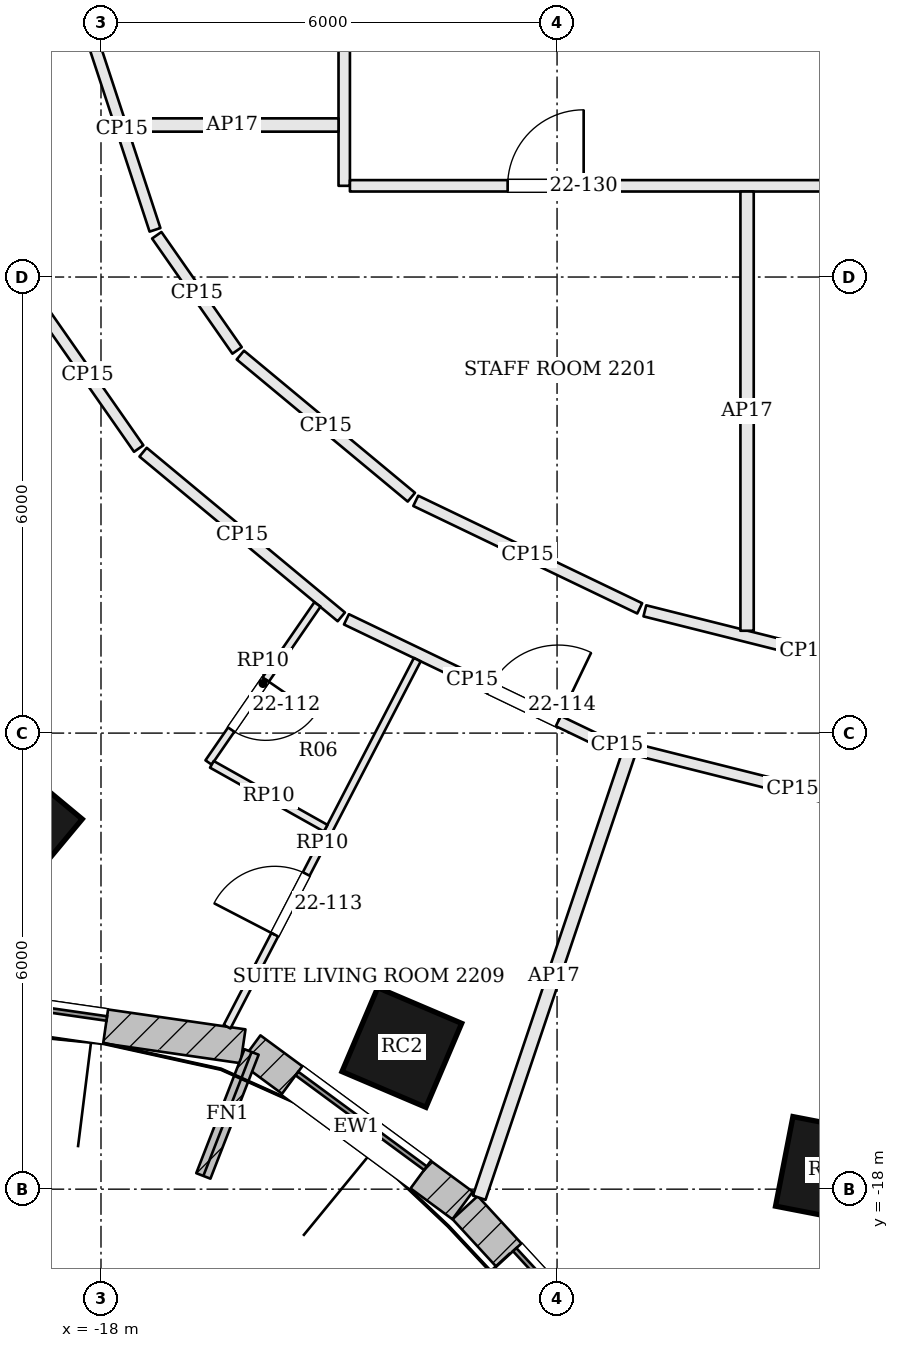
"""IFC4 building model, lengths in metres.
Left out: names, types, materials, properties, quantities, classifications, styles, units other than length and angle.
Written with IfcOpenShell. Run it as: python <this file> out.ifc"""

import sys

from ifc_helpers import new_model, si_unit, direction, frame, frame_2d, origin, origin_2d, place, context, subcontext, project, spatial, rectangle, extrude, element, fill, save


model = new_model("IFC4")
c1 = context("Model", 3, precision=1e-05, world=origin(), true_north=direction((0.0, 1.0)))
c2 = subcontext(c1, "Body", "Model", "MODEL_VIEW")
j1 = project(units=[si_unit("LENGTHUNIT", "METRE"), si_unit("PLANEANGLEUNIT", "RADIAN")], contexts=[c1])
p1 = place(None, origin())
s1 = spatial("IfcSite", under=j1, at=p1, CompositionType="ELEMENT")
p2 = place(p1, origin())
s2 = spatial("IfcBuilding", under=s1, at=p2, CompositionType="ELEMENT")
p3 = place(p2, frame((0.0, 0.0, 96.0)))
s3 = spatial("IfcBuildingStorey", under=s2, at=p3, CompositionType="ELEMENT", Elevation=96.0)
for number, where, z_axis, x_axis in (
    (1, (-19.092, -13.209, 0.0), (0.0, 0.0, 1.0), (0.769, -0.639, 0.0)),
    (2, (-14.042, -16.136, 0.0), (0.0, 0.0, 1.0), (0.92, -0.392, 0.0)),
    (3, (-8.422, -17.749, 0.0), (0.0, 0.0, 1.0), (0.982, -0.191, 0.0)),
):
    element("IfcColumn", number, at=place(p3, frame(where, z_axis=z_axis, x_axis=x_axis)), inside=s3, PredefinedType="COLUMN", context=c2, shape_type="SweptSolid", body=[
        extrude(rectangle(XDim=1.2, YDim=1.2, at=origin_2d()), origin(), (0.0, 0.0, 1.0), 3.6),
    ])
p4 = place(p3, frame((-21.825, -15.297, 0.0), z_axis=(0.0, 0.0, 1.0), x_axis=(0.98971474215, -0.143054986527, 0.0)))
e4 = element("IfcWall", 4, at=p4, inside=s3, PredefinedType="SOLIDWALL", context=c2, shape_type="SweptSolid", body=[
    extrude(rectangle(XDim=5.753, YDim=0.45, at=frame_2d((2.876, 0.0))), origin(), (0.0, 0.0, 1.0), 3.4),
])
p5 = place(p4, frame((1.826, 0.0, 0.9)))
e5 = element("IfcOpeningElement", 5, at=p5, cuts=e4, PredefinedType="OPENING", context=c2, shape_type="SweptSolid", body=[
    extrude(rectangle(XDim=2.1, YDim=2.0, at=frame_2d((1.05, 1.0))), frame((0.0, 0.235, 0.0), z_axis=(0.0, -1.0, 0.0), x_axis=(1.0, 0.0, 0.0)), (0.0, 0.0, 1.0), 0.47),
])
p6 = place(p3, frame((-16.036, -16.158, 0.0), z_axis=(0.0, 0.0, 1.0), x_axis=(0.805181432967, -0.593028549064, 0.0)))
e6 = element("IfcWall", 6, at=p6, inside=s3, PredefinedType="SOLIDWALL", context=c2, shape_type="SweptSolid", body=[
    extrude(rectangle(XDim=3.469, YDim=0.45, at=frame_2d((1.734, 0.0))), origin(), (0.0, 0.0, 1.0), 3.4),
])
p7 = place(p6, frame((0.684, 0.0, 0.9)))
e7 = element("IfcOpeningElement", 7, at=p7, cuts=e6, PredefinedType="OPENING", context=c2, shape_type="SweptSolid", body=[
    extrude(rectangle(XDim=2.1, YDim=2.0, at=frame_2d((1.05, 1.0))), frame((0.0, 0.235, 0.0), z_axis=(0.0, -1.0, 0.0), x_axis=(1.0, 0.0, 0.0)), (0.0, 0.0, 1.0), 0.47),
])
p8 = place(p3, frame((-13.209, -18.243, 0.0), z_axis=(0.0, 0.0, 1.0), x_axis=(0.677612152497, -0.735419452278, 0.0)))
e8 = element("IfcWall", 8, at=p8, inside=s3, PredefinedType="SOLIDWALL", context=c2, shape_type="SweptSolid", body=[
    extrude(rectangle(XDim=3.797, YDim=0.45, at=frame_2d((1.898, 0.0))), origin(), (0.0, 0.0, 1.0), 3.4),
])
p9 = place(p8, frame((0.848, 0.0, 0.9)))
e9 = element("IfcOpeningElement", 9, at=p9, cuts=e8, PredefinedType="OPENING", context=c2, shape_type="SweptSolid", body=[
    extrude(rectangle(XDim=2.1, YDim=2.0, at=frame_2d((1.05, 1.0))), frame((0.0, 0.235, 0.0), z_axis=(0.0, -1.0, 0.0), x_axis=(1.0, 0.0, 0.0)), (0.0, 0.0, 1.0), 0.47),
])
p10 = place(p3, frame((-16.019, -16.195, 0.0), z_axis=(0.0, 0.0, 1.0), x_axis=(-0.362641522028, -0.931928713208, 0.0)))
e10 = element("IfcWall", 10, at=p10, inside=s3, PredefinedType="SOLIDWALL", context=c2, shape_type="SweptSolid", body=[
    extrude(rectangle(XDim=1.75, YDim=0.2, at=frame_2d((0.875, 0.0))), origin(), (0.0, 0.0, 1.0), 3.4),
])
p11 = place(p3, frame((-18.851, -6.325, 0.0), z_axis=(0.0, 0.0, 1.0), x_axis=(0.572090775968, -0.820190309656, 0.0)))
e11 = element("IfcWall", 11, at=p11, inside=s3, PredefinedType="PARTITIONING", context=c2, shape_type="SweptSolid", body=[
    extrude(rectangle(XDim=2.355, YDim=0.15, at=frame_2d((1.177, 0.0))), origin(), (0.0, 0.0, 1.0), 2.784),
])
p12 = place(p3, frame((-17.446, -8.304, 0.0), z_axis=(0.0, 0.0, 1.0), x_axis=(0.769200174495, -0.639007896318, 0.0)))
e12 = element("IfcWall", 12, at=p12, inside=s3, PredefinedType="PARTITIONING", context=c2, shape_type="SweptSolid", body=[
    extrude(rectangle(XDim=3.39, YDim=0.15, at=frame_2d((1.695, 0.0))), origin(), (0.0, 0.0, 1.0), 2.784),
])
p13 = place(p3, frame((-14.771, -10.503, 0.0), z_axis=(0.0, 0.0, 1.0), x_axis=(0.901503349553, -0.432772123346, 0.0)))
e13 = element("IfcWall", 13, at=p13, inside=s3, PredefinedType="PARTITIONING", context=c2, shape_type="SweptSolid", body=[
    extrude(rectangle(XDim=3.673, YDim=0.15, at=frame_2d((1.836, 0.0))), origin(), (0.0, 0.0, 1.0), 2.784),
])
p14 = place(p13, frame((2.092, 0.0, 0.0)))
e14 = element("IfcOpeningElement", 14, at=p14, cuts=e13, PredefinedType="OPENING", context=c2, shape_type="SweptSolid", body=[
    extrude(rectangle(XDim=1.0, YDim=2.1, at=frame_2d((0.5, 1.05))), frame((0.0, 0.085, 0.0), z_axis=(0.0, -1.0, 0.0), x_axis=(1.0, 0.0, 0.0)), (0.0, 0.0, 1.0), 0.17),
])
p15 = place(p3, frame((-11.387, -12.111, 0.0), z_axis=(0.0, 0.0, 1.0), x_axis=(0.969945028314, -0.243324150157, 0.0)))
e15 = element("IfcWall", 15, at=p15, inside=s3, PredefinedType="PARTITIONING", context=c2, shape_type="SweptSolid", body=[
    extrude(rectangle(XDim=0.364, YDim=0.15, at=frame_2d((0.182, 0.0))), origin(), (0.0, 0.0, 1.0), 2.784),
])
p16 = place(p3, frame((-13.024, -18.112, 0.0), z_axis=(0.0, 0.0, 1.0), x_axis=(0.319078434674, 0.947728311556, 0.0)))
e16 = element("IfcWall", 16, at=p16, inside=s3, PredefinedType="PARTITIONING", context=c2, shape_type="SweptSolid", body=[
    extrude(rectangle(XDim=6.163, YDim=0.175, at=frame_2d((3.082, 0.0))), origin(), (0.0, 0.0, 1.0), 2.784),
])
p17 = place(p3, frame((-10.961, -12.218, 0.0), z_axis=(0.0, 0.0, 1.0), x_axis=(0.969990045386, -0.243144631551, 0.0)))
e17 = element("IfcWall", 17, at=p17, inside=s3, PredefinedType="PARTITIONING", context=c2, shape_type="SweptSolid", body=[
    extrude(rectangle(XDim=4.244, YDim=0.15, at=frame_2d((2.122, 0.0))), origin(), (0.0, 0.0, 1.0), 2.784),
])
p18 = place(p3, frame((-6.617, -11.451, 0.0), z_axis=(0.0, 0.0, 1.0), x_axis=(-0.969987441267, 0.243155020069, 0.0)))
e18 = element("IfcWall", 18, at=p18, inside=s3, PredefinedType="PARTITIONING", context=c2, shape_type="SweptSolid", body=[
    extrude(rectangle(XDim=4.359, YDim=0.15, at=frame_2d((2.179, 0.0))), origin(), (0.0, 0.0, 1.0), 2.784),
])
p19 = place(p3, frame((-10.913, -10.359, 0.0), z_axis=(0.0, 0.0, 1.0), x_axis=(-0.90149741277, 0.432784489982, 0.0)))
e19 = element("IfcWall", 19, at=p19, inside=s3, PredefinedType="PARTITIONING", context=c2, shape_type="SweptSolid", body=[
    extrude(rectangle(XDim=3.269, YDim=0.15, at=frame_2d((1.634, 0.0))), origin(), (0.0, 0.0, 1.0), 2.784),
])
p20 = place(p3, frame((-13.917, -8.896, 0.0), z_axis=(0.0, 0.0, 1.0), x_axis=(-0.769130409479, 0.639091866021, 0.0)))
e20 = element("IfcWall", 20, at=p20, inside=s3, PredefinedType="PARTITIONING", context=c2, shape_type="SweptSolid", body=[
    extrude(rectangle(XDim=2.925, YDim=0.15, at=frame_2d((1.462, 0.0))), origin(), (0.0, 0.0, 1.0), 2.784),
])
p21 = place(p3, frame((-16.209, -6.966, 0.0), z_axis=(0.0, 0.0, 1.0), x_axis=(-0.572051367607, 0.820217795966, 0.0)))
e21 = element("IfcWall", 21, at=p21, inside=s3, PredefinedType="PARTITIONING", context=c2, shape_type="SweptSolid", body=[
    extrude(rectangle(XDim=1.848, YDim=0.15, at=frame_2d((0.924, 0.0))), origin(), (0.0, 0.0, 1.0), 2.784),
])
p22 = place(p3, frame((-17.29, -5.379, 0.0), z_axis=(0.0, 0.0, 1.0), x_axis=(-0.312009486843, 0.950078986253, 0.0)))
e22 = element("IfcWall", 22, at=p22, inside=s3, PredefinedType="PARTITIONING", context=c2, shape_type="SweptSolid", body=[
    extrude(rectangle(XDim=2.78, YDim=0.15, at=frame_2d((1.39, 0.0))), origin(), (0.0, 0.0, 1.0), 2.784),
])
p23 = place(p3, frame((-14.8, 8.148, 0.0), z_axis=(0.0, 0.0, 1.0), x_axis=(0.0, -1.0, 0.0)))
e23 = element("IfcWall", 23, at=p23, inside=s3, PredefinedType="PARTITIONING", context=c2, shape_type="SweptSolid", body=[
    extrude(rectangle(XDim=12.948, YDim=0.15, at=frame_2d((6.474, 0.0))), origin(), (0.0, 0.0, 1.0), 2.784),
])
p24 = place(p23, frame((5.687, 0.0, 0.0)))
e24 = element("IfcOpeningElement", 24, at=p24, cuts=e23, PredefinedType="OPENING", context=c2, shape_type="SweptSolid", body=[
    extrude(rectangle(XDim=0.7, YDim=2.1, at=frame_2d((0.35, 1.05))), frame((0.0, 0.085, 0.0), z_axis=(0.0, -1.0, 0.0), x_axis=(1.0, 0.0, 0.0)), (0.0, 0.0, 1.0), 0.17),
])
p25 = place(p3, frame((-14.725, -4.8, 0.0), z_axis=(0.0, 0.0, 1.0), x_axis=(1.0, 0.0, 0.0)))
e25 = element("IfcWall", 25, at=p25, inside=s3, PredefinedType="PARTITIONING", context=c2, shape_type="SweptSolid", body=[
    extrude(rectangle(XDim=29.525, YDim=0.15, at=frame_2d((14.763, 0.0))), origin(), (0.0, 0.0, 1.0), 2.784),
])
p26 = place(p25, frame((2.075, 0.0, 0.0)))
e26 = element("IfcOpeningElement", 26, at=p26, cuts=e25, PredefinedType="OPENING", context=c2, shape_type="SweptSolid", body=[
    extrude(rectangle(XDim=1.0, YDim=2.1, at=frame_2d((0.5, 1.05))), frame((0.0, 0.085, 0.0), z_axis=(0.0, -1.0, 0.0), x_axis=(1.0, 0.0, 0.0)), (0.0, 0.0, 1.0), 0.17),
])
p27 = place(p25, frame((13.825, 0.0, 0.0)))
e27 = element("IfcOpeningElement", 27, at=p27, cuts=e25, PredefinedType="OPENING", context=c2, shape_type="SweptSolid", body=[
    extrude(rectangle(XDim=1.8, YDim=2.1, at=frame_2d((0.9, 1.05))), frame((0.0, 0.085, 0.0), z_axis=(0.0, -1.0, 0.0), x_axis=(1.0, 0.0, 0.0)), (0.0, 0.0, 1.0), 0.17),
])
p28 = place(p25, frame((26.525, 0.0, 0.0)))
e28 = element("IfcOpeningElement", 28, at=p28, cuts=e25, PredefinedType="OPENING", context=c2, shape_type="SweptSolid", body=[
    extrude(rectangle(XDim=0.7, YDim=2.1, at=frame_2d((0.35, 1.05))), frame((0.0, 0.085, 0.0), z_axis=(0.0, -1.0, 0.0), x_axis=(1.0, 0.0, 0.0)), (0.0, 0.0, 1.0), 0.17),
])
p29 = place(p3, frame((-16.341, -15.862, 0.0), z_axis=(0.0, 0.0, 1.0), x_axis=(0.460149427678, 0.887841485969, 0.0)))
e29 = element("IfcWall", 29, at=p29, inside=s3, PredefinedType="PARTITIONING", context=c2, shape_type="SweptSolid", body=[
    extrude(rectangle(XDim=5.438, YDim=0.1, at=frame_2d((2.719, 0.0))), origin(), (0.0, 0.0, 1.0), 2.884),
])
p30 = place(p29, frame((1.363, 0.0, 0.0)))
e30 = element("IfcOpeningElement", 30, at=p30, cuts=e29, PredefinedType="OPENING", context=c2, shape_type="SweptSolid", body=[
    extrude(rectangle(XDim=0.9, YDim=2.4, at=frame_2d((0.45, 1.2))), frame((0.0, 0.06, 0.0), z_axis=(0.0, -1.0, 0.0), x_axis=(1.0, 0.0, 0.0)), (0.0, 0.0, 1.0), 0.12),
])
p31 = place(p3, frame((-15.152, -10.307, 0.0), z_axis=(0.0, 0.0, 1.0), x_axis=(-0.567242581317, -0.823550759784, 0.0)))
e31 = element("IfcWall", 31, at=p31, inside=s3, PredefinedType="PARTITIONING", context=c2, shape_type="SweptSolid", body=[
    extrude(rectangle(XDim=2.525, YDim=0.1, at=frame_2d((1.263, 0.0))), origin(), (0.0, 0.0, 1.0), 2.884),
])
p32 = place(p31, frame((1.2, 0.0, 0.0)))
e32 = element("IfcOpeningElement", 32, at=p32, cuts=e31, PredefinedType="OPENING", context=c2, shape_type="SweptSolid", body=[
    extrude(rectangle(XDim=0.8, YDim=2.1, at=frame_2d((0.4, 1.05))), frame((0.0, 0.06, 0.0), z_axis=(0.0, -1.0, 0.0), x_axis=(1.0, 0.0, 0.0)), (0.0, 0.0, 1.0), 0.12),
])
p33 = place(p3, frame((-16.541, -12.411, 0.0), z_axis=(0.0, 0.0, 1.0), x_axis=(0.872042364088, -0.489430398765, 0.0)))
e33 = element("IfcWall", 33, at=p33, inside=s3, PredefinedType="PARTITIONING", context=c2, shape_type="SweptSolid", body=[
    extrude(rectangle(XDim=1.717, YDim=0.1, at=frame_2d((0.858, 0.0))), origin(), (0.0, 0.0, 1.0), 2.884),
])
p34 = place(p3, frame((-9.5, -10.654, 0.0), z_axis=(0.0, 0.0, 1.0), x_axis=(0.0, 1.0, 0.0)))
e34 = element("IfcWall", 34, at=p34, inside=s3, PredefinedType="PARTITIONING", context=c2, shape_type="SweptSolid", body=[
    extrude(rectangle(XDim=5.779, YDim=0.175, at=frame_2d((2.889, 0.0))), origin(), (0.0, 0.0, 1.0), 2.784),
])
p35 = place(p3, frame((-17.668, -4.0, 0.0), z_axis=(0.0, 0.0, 1.0), x_axis=(1.0, 0.0, 0.0)))
e35 = element("IfcWall", 35, at=p35, inside=s3, PredefinedType="PARTITIONING", context=c2, shape_type="SweptSolid", body=[
    extrude(rectangle(XDim=2.793, YDim=0.175, at=frame_2d((1.396, 0.0))), origin(), (0.0, 0.0, 1.0), 2.784),
])
p36 = place(p5, origin())
e36 = element("IfcWindow", 36, at=p36, inside=s3, PartitioningType="SINGLE_PANEL", PredefinedType="WINDOW", context=c2, shape_type="SweptSolid", body=[
    extrude(rectangle(XDim=2.1, YDim=2.0, at=frame_2d((1.05, 1.0))), frame((0.0, 0.135, 0.0), z_axis=(0.0, -1.0, 0.0), x_axis=(1.0, 0.0, 0.0)), (0.0, 0.0, 1.0), 0.06),
])
fill(e5, e36)
p37 = place(p7, origin())
e37 = element("IfcWindow", 37, at=p37, inside=s3, PartitioningType="SINGLE_PANEL", PredefinedType="WINDOW", context=c2, shape_type="SweptSolid", body=[
    extrude(rectangle(XDim=2.1, YDim=2.0, at=frame_2d((1.05, 1.0))), frame((0.0, 0.135, 0.0), z_axis=(0.0, -1.0, 0.0), x_axis=(1.0, 0.0, 0.0)), (0.0, 0.0, 1.0), 0.06),
])
fill(e7, e37)
p38 = place(p9, origin())
e38 = element("IfcWindow", 38, at=p38, inside=s3, PartitioningType="SINGLE_PANEL", PredefinedType="WINDOW", context=c2, shape_type="SweptSolid", body=[
    extrude(rectangle(XDim=2.1, YDim=2.0, at=frame_2d((1.05, 1.0))), frame((0.0, 0.135, 0.0), z_axis=(0.0, -1.0, 0.0), x_axis=(1.0, 0.0, 0.0)), (0.0, 0.0, 1.0), 0.06),
])
fill(e9, e38)
p39 = place(p32, origin())
e39 = element("IfcDoor", 39, at=p39, inside=s3, OperationType="SINGLE_SWING_LEFT", PredefinedType="DOOR", context=c2, shape_type="SweptSolid", body=[
    extrude(rectangle(XDim=0.8, YDim=2.1, at=frame_2d((0.4, 1.05))), frame((0.0, 0.025, 0.0), z_axis=(0.0, -1.0, 0.0), x_axis=(1.0, 0.0, 0.0)), (0.0, 0.0, 1.0), 0.05),
])
fill(e32, e39)
p40 = place(p30, origin())
e40 = element("IfcDoor", 40, at=p40, inside=s3, OperationType="SINGLE_SWING_LEFT", PredefinedType="DOOR", context=c2, shape_type="SweptSolid", body=[
    extrude(rectangle(XDim=0.9, YDim=2.4, at=frame_2d((0.45, 1.2))), frame((0.0, 0.025, 0.0), z_axis=(0.0, -1.0, 0.0), x_axis=(1.0, 0.0, 0.0)), (0.0, 0.0, 1.0), 0.05),
])
fill(e30, e40)
p41 = place(p14, origin())
e41 = element("IfcDoor", 41, at=p41, inside=s3, OperationType="SINGLE_SWING_RIGHT", PredefinedType="DOOR", context=c2, shape_type="SweptSolid", body=[
    extrude(rectangle(XDim=1.0, YDim=2.1, at=frame_2d((0.5, 1.05))), frame((0.0, 0.025, 0.0), z_axis=(0.0, -1.0, 0.0), x_axis=(1.0, 0.0, 0.0)), (0.0, 0.0, 1.0), 0.05),
])
fill(e14, e41)
p42 = place(p26, origin())
e42 = element("IfcDoor", 42, at=p42, inside=s3, OperationType="SINGLE_SWING_RIGHT", PredefinedType="DOOR", context=c2, shape_type="SweptSolid", body=[
    extrude(rectangle(XDim=1.0, YDim=2.1, at=frame_2d((0.5, 1.05))), frame((0.0, 0.025, 0.0), z_axis=(0.0, -1.0, 0.0), x_axis=(1.0, 0.0, 0.0)), (0.0, 0.0, 1.0), 0.05),
])
fill(e26, e42)
save(model, sys.argv[1])
